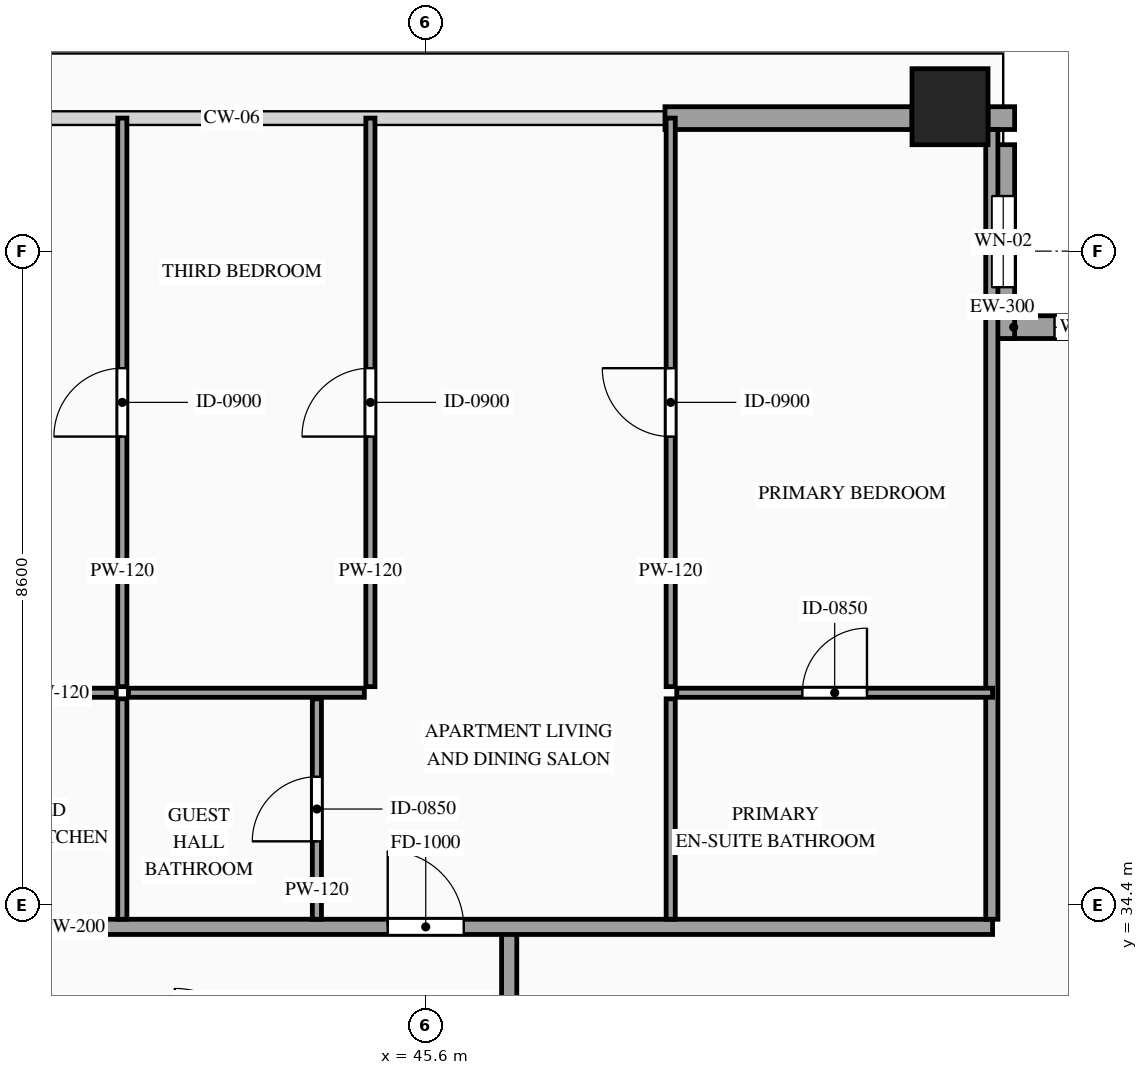
"""IFC4 building model, lengths in metres.
Left out: names, types, materials, properties, quantities, classifications, styles, units other than length and angle.
Written with IfcOpenShell. Run it as: python <this file> out.ifc"""

import sys

from ifc_helpers import new_model, si_unit, direction, frame, frame_2d, origin, origin_2d, place, context, subcontext, project, spatial, rectangle, hollow_rectangle, extrude, source, transform, mapped, element, fill, save


model = new_model("IFC4")
c1 = context("Model", 3, precision=1e-05, world=origin(), true_north=direction((0.0, 1.0)))
c2 = subcontext(c1, "Body", "Model", "MODEL_VIEW")
j1 = project(units=[si_unit("LENGTHUNIT", "METRE"), si_unit("PLANEANGLEUNIT", "RADIAN")], contexts=[c1])
p1 = place(None, origin())
s1 = spatial("IfcSite", under=j1, at=p1, CompositionType="ELEMENT")
p2 = place(p1, origin())
s2 = spatial("IfcBuilding", under=s1, at=p2, CompositionType="ELEMENT")
p3 = place(p2, frame((0.0, 0.0, 299.6)))
s3 = spatial("IfcBuildingStorey", under=s2, at=p3, CompositionType="ELEMENT", Elevation=299.6)
m1 = source(origin(), c2, "Body", "SweptSolid", [
    extrude(hollow_rectangle(XDim=1.0, YDim=1.0, WallThickness=0.048, at=origin_2d()), origin(), (0.0, 0.0, 1.0), 3.5),
])
p4 = place(p3, frame((52.5, 44.9, 0.0), z_axis=(0.0, 0.0, 1.0), x_axis=(1.0, 0.0, 0.0)))
e1 = element("IfcColumn", 1, at=p4, inside=s3, PredefinedType="COLUMN", context=c2, shape_type="MappedRepresentation", body=[
    mapped(m1, transform((0.0, 0.0, 0.0), scale=1.0)),
])
p5 = place(p3, frame((55.6, 42.0, 0.0), z_axis=(0.0, 0.0, 1.0), x_axis=(-1.0, 0.0, 0.0)))
e2 = element("IfcWall", 2, at=p5, inside=s3, PredefinedType="SOLIDWALL", context=c2, shape_type="SweptSolid", body=[
    extrude(rectangle(XDim=2.55, YDim=0.3, at=frame_2d((1.275, 0.0))), origin(), (0.0, 0.0, 1.0), 3.28),
])
p6 = place(p5, frame((0.825, 0.0, 0.85)))
e3 = element("IfcOpeningElement", 3, at=p6, cuts=e2, PredefinedType="OPENING", context=c2, shape_type="SweptSolid", body=[
    extrude(rectangle(XDim=0.9, YDim=1.5, at=frame_2d((0.45, 0.75))), frame((0.0, 0.165, 0.0), z_axis=(0.0, -1.0, 0.0), x_axis=(1.0, 0.0, 0.0)), (0.0, 0.0, 1.0), 0.33),
])
p7 = place(p3, frame((53.2, 41.85, 0.0), z_axis=(0.0, 0.0, 1.0), x_axis=(0.0, 1.0, 0.0)))
e4 = element("IfcWall", 4, at=p7, inside=s3, PredefinedType="SOLIDWALL", context=c2, shape_type="SweptSolid", body=[
    extrude(rectangle(XDim=2.55, YDim=0.3, at=frame_2d((1.275, 0.0))), origin(), (0.0, 0.0, 1.0), 3.28),
])
p8 = place(p7, frame((0.675, 0.0, 0.85)))
e5 = element("IfcOpeningElement", 5, at=p8, cuts=e4, PredefinedType="OPENING", context=c2, shape_type="SweptSolid", body=[
    extrude(rectangle(XDim=1.2, YDim=2.1, at=frame_2d((0.6, 1.05))), frame((0.0, 0.165, 0.0), z_axis=(0.0, -1.0, 0.0), x_axis=(1.0, 0.0, 0.0)), (0.0, 0.0, 1.0), 0.33),
])
m2 = source(origin(), c2, "Body", "SweptSolid", [
    extrude(rectangle(XDim=0.35, YDim=0.3, at=frame_2d((0.175, 0.0))), origin(), (0.0, 0.0, 1.0), 3.28),
])
p9 = place(p3, frame((53.0, 44.75, 0.0), z_axis=(0.0, 0.0, 1.0), x_axis=(1.0, 0.0, 0.0)))
e6 = element("IfcWall", 6, at=p9, inside=s3, PredefinedType="SOLIDWALL", context=c2, shape_type="MappedRepresentation", body=[
    mapped(m2, transform((0.0, 0.0, 0.0), scale=1.0)),
])
m3 = source(origin(), c2, "Body", "SweptSolid", [
    extrude(rectangle(XDim=3.25, YDim=0.3, at=frame_2d((1.625, 0.0))), origin(), (0.0, 0.0, 1.0), 2.885),
])
p10 = place(p3, frame((48.75, 44.75, 0.0), z_axis=(0.0, 0.0, 1.0), x_axis=(1.0, 0.0, 0.0)))
e7 = element("IfcWall", 7, at=p10, inside=s3, PredefinedType="SOLIDWALL", context=c2, shape_type="MappedRepresentation", body=[
    mapped(m3, transform((0.0, 0.0, 0.0), scale=1.0)),
])
m4 = source(origin(), c2, "Body", "SweptSolid", [
    extrude(rectangle(XDim=1.7, YDim=0.2, at=frame_2d((0.85, 0.0))), origin(), (0.0, 0.0, 1.0), 3.28),
])
p11 = place(p3, frame((46.7, 32.35, 0.0), z_axis=(0.0, 0.0, 1.0), x_axis=(0.0, 1.0, 0.0)))
e8 = element("IfcWall", 8, at=p11, inside=s3, PredefinedType="PARTITIONING", context=c2, shape_type="MappedRepresentation", body=[
    mapped(m4, transform((0.0, 0.0, 0.0), scale=1.0)),
])
p12 = place(p3, frame((37.08, 34.11, 0.0), z_axis=(0.0, 0.0, 1.0), x_axis=(1.0, 0.0, 0.0)))
e9 = element("IfcWall", 9, at=p12, inside=s3, PredefinedType="PARTITIONING", context=c2, shape_type="SweptSolid", body=[
    extrude(rectangle(XDim=15.98, YDim=0.2, at=frame_2d((7.99, 0.0))), origin(), (0.0, 0.0, 1.0), 3.28),
])
p13 = place(p12, frame((8.022, 0.0, 0.0)))
e10 = element("IfcOpeningElement", 10, at=p13, cuts=e9, PredefinedType="OPENING", context=c2, shape_type="SweptSolid", body=[
    extrude(rectangle(XDim=1.0, YDim=2.2, at=frame_2d((0.5, 1.1))), frame((0.0, 0.115, 0.0), z_axis=(0.0, -1.0, 0.0), x_axis=(1.0, 0.0, 0.0)), (0.0, 0.0, 1.0), 0.23),
])
m5 = source(origin(), c2, "Body", "SweptSolid", [
    extrude(rectangle(XDim=10.39, YDim=0.16, at=frame_2d((5.195, 0.0))), origin(), (0.0, 0.0, 1.0), 3.28),
])
p14 = place(p3, frame((53.05, 34.21, 0.0), z_axis=(0.0, 0.0, 1.0), x_axis=(0.0, 1.0, 0.0)))
e11 = element("IfcWall", 11, at=p14, inside=s3, PredefinedType="PARTITIONING", context=c2, shape_type="MappedRepresentation", body=[
    mapped(m5, transform((0.0, 0.0, 0.0), scale=1.0)),
])
p15 = place(p3, frame((37.08, 37.19, 0.0), z_axis=(0.0, 0.0, 1.0), x_axis=(1.0, 0.0, 0.0)))
e12 = element("IfcWall", 12, at=p15, inside=s3, PredefinedType="PARTITIONING", context=c2, shape_type="SweptSolid", body=[
    extrude(rectangle(XDim=4.45, YDim=0.12, at=frame_2d((2.225, 0.0))), origin(), (0.0, 0.0, 1.0), 3.28),
])
p16 = place(p15, frame((1.8, 0.0, 0.0)))
e13 = element("IfcOpeningElement", 13, at=p16, cuts=e12, PredefinedType="OPENING", context=c2, shape_type="SweptSolid", body=[
    extrude(rectangle(XDim=0.85, YDim=2.1, at=frame_2d((0.425, 1.05))), frame((0.0, 0.075, 0.0), z_axis=(0.0, -1.0, 0.0), x_axis=(1.0, 0.0, 0.0)), (0.0, 0.0, 1.0), 0.15),
])
m6 = source(origin(), c2, "Body", "SweptSolid", [
    extrude(rectangle(XDim=2.9, YDim=0.12, at=frame_2d((1.45, 0.0))), origin(), (0.0, 0.0, 1.0), 3.28),
])
p17 = place(p3, frame((41.61, 34.21, 0.0), z_axis=(0.0, 0.0, 1.0), x_axis=(0.0, 1.0, 0.0)))
e14 = element("IfcWall", 14, at=p17, inside=s3, PredefinedType="PARTITIONING", context=c2, shape_type="MappedRepresentation", body=[
    mapped(m6, transform((0.0, 0.0, 0.0), scale=1.0)),
])
p18 = place(p3, frame((44.17, 34.21, 0.0), z_axis=(0.0, 0.0, 1.0), x_axis=(0.0, 1.0, 0.0)))
e15 = element("IfcWall", 15, at=p18, inside=s3, PredefinedType="PARTITIONING", context=c2, shape_type="SweptSolid", body=[
    extrude(rectangle(XDim=2.9, YDim=0.12, at=frame_2d((1.45, 0.0))), origin(), (0.0, 0.0, 1.0), 3.28),
])
p19 = place(p18, frame((1.025, 0.0, 0.0)))
e16 = element("IfcOpeningElement", 16, at=p19, cuts=e15, PredefinedType="OPENING", context=c2, shape_type="SweptSolid", body=[
    extrude(rectangle(XDim=0.85, YDim=2.1, at=frame_2d((0.425, 1.05))), frame((0.0, 0.075, 0.0), z_axis=(0.0, -1.0, 0.0), x_axis=(1.0, 0.0, 0.0)), (0.0, 0.0, 1.0), 0.15),
])
p20 = place(p3, frame((48.905, 37.19, 0.0), z_axis=(0.0, 0.0, 1.0), x_axis=(1.0, 0.0, 0.0)))
e17 = element("IfcWall", 17, at=p20, inside=s3, PredefinedType="PARTITIONING", context=c2, shape_type="SweptSolid", body=[
    extrude(rectangle(XDim=4.155, YDim=0.12, at=frame_2d((2.078, 0.0))), origin(), (0.0, 0.0, 1.0), 3.28),
])
p21 = place(p20, frame((1.653, 0.0, 0.0)))
e18 = element("IfcOpeningElement", 18, at=p21, cuts=e17, PredefinedType="OPENING", context=c2, shape_type="SweptSolid", body=[
    extrude(rectangle(XDim=0.85, YDim=2.1, at=frame_2d((0.425, 1.05))), frame((0.0, 0.075, 0.0), z_axis=(0.0, -1.0, 0.0), x_axis=(1.0, 0.0, 0.0)), (0.0, 0.0, 1.0), 0.15),
])
p22 = place(p3, frame((48.825, 34.21, 0.0), z_axis=(0.0, 0.0, 1.0), x_axis=(0.0, 1.0, 0.0)))
e19 = element("IfcWall", 19, at=p22, inside=s3, PredefinedType="PARTITIONING", context=c2, shape_type="MappedRepresentation", body=[
    mapped(m6, transform((0.0, 0.0, 0.0), scale=1.0)),
])
p23 = place(p3, frame((41.61, 37.27, 0.0), z_axis=(0.0, 0.0, 1.0), x_axis=(0.0, 1.0, 0.0)))
e20 = element("IfcWall", 20, at=p23, inside=s3, PredefinedType="PARTITIONING", context=c2, shape_type="SweptSolid", body=[
    extrude(rectangle(XDim=7.48, YDim=0.12, at=frame_2d((3.74, 0.0))), origin(), (0.0, 0.0, 1.0), 3.28),
])
p24 = place(p23, frame((3.29, 0.0, 0.0)))
e21 = element("IfcOpeningElement", 21, at=p24, cuts=e20, PredefinedType="OPENING", context=c2, shape_type="SweptSolid", body=[
    extrude(rectangle(XDim=0.9, YDim=2.15, at=frame_2d((0.45, 1.075))), frame((0.0, 0.075, 0.0), z_axis=(0.0, -1.0, 0.0), x_axis=(1.0, 0.0, 0.0)), (0.0, 0.0, 1.0), 0.15),
])
p25 = place(p3, frame((48.825, 37.27, 0.0), z_axis=(0.0, 0.0, 1.0), x_axis=(0.0, 1.0, 0.0)))
e22 = element("IfcWall", 22, at=p25, inside=s3, PredefinedType="PARTITIONING", context=c2, shape_type="SweptSolid", body=[
    extrude(rectangle(XDim=7.48, YDim=0.12, at=frame_2d((3.74, 0.0))), origin(), (0.0, 0.0, 1.0), 3.28),
])
p26 = place(p25, frame((3.29, 0.0, 0.0)))
e23 = element("IfcOpeningElement", 23, at=p26, cuts=e22, PredefinedType="OPENING", context=c2, shape_type="SweptSolid", body=[
    extrude(rectangle(XDim=0.9, YDim=2.15, at=frame_2d((0.45, 1.075))), frame((0.0, 0.075, 0.0), z_axis=(0.0, -1.0, 0.0), x_axis=(1.0, 0.0, 0.0)), (0.0, 0.0, 1.0), 0.15),
])
m7 = source(origin(), c2, "Body", "SweptSolid", [
    extrude(rectangle(XDim=3.104, YDim=0.12, at=frame_2d((1.552, 0.0))), origin(), (0.0, 0.0, 1.0), 3.28),
])
p27 = place(p3, frame((41.69, 37.19, 0.0), z_axis=(0.0, 0.0, 1.0), x_axis=(1.0, 0.0, 0.0)))
e24 = element("IfcWall", 24, at=p27, inside=s3, PredefinedType="PARTITIONING", context=c2, shape_type="MappedRepresentation", body=[
    mapped(m7, transform((0.0, 0.0, 0.0), scale=1.0)),
])
p28 = place(p3, frame((44.874, 37.27, 0.0), z_axis=(0.0, 0.0, 1.0), x_axis=(0.0, 1.0, 0.0)))
e25 = element("IfcWall", 25, at=p28, inside=s3, PredefinedType="PARTITIONING", context=c2, shape_type="SweptSolid", body=[
    extrude(rectangle(XDim=7.48, YDim=0.12, at=frame_2d((3.74, 0.0))), origin(), (0.0, 0.0, 1.0), 3.28),
])
p29 = place(p28, frame((3.29, 0.0, 0.0)))
e26 = element("IfcOpeningElement", 26, at=p29, cuts=e25, PredefinedType="OPENING", context=c2, shape_type="SweptSolid", body=[
    extrude(rectangle(XDim=0.9, YDim=2.15, at=frame_2d((0.45, 1.075))), frame((0.0, 0.075, 0.0), z_axis=(0.0, -1.0, 0.0), x_axis=(1.0, 0.0, 0.0)), (0.0, 0.0, 1.0), 0.15),
])
m8 = source(origin(), c2, "Body", "SweptSolid", [
    extrude(rectangle(XDim=0.9, YDim=1.5, at=frame_2d((0.45, 0.75))), frame((0.0, 0.03, 0.0), z_axis=(0.0, -1.0, 0.0), x_axis=(1.0, 0.0, 0.0)), (0.0, 0.0, 1.0), 0.06),
])
p30 = place(p6, origin())
e27 = element("IfcWindow", 27, at=p30, inside=s3, PartitioningType="SINGLE_PANEL", PredefinedType="WINDOW", context=c2, shape_type="MappedRepresentation", body=[
    mapped(m8, transform((0.0, 0.0, 0.0), scale=1.0)),
])
fill(e3, e27)
m9 = source(origin(), c2, "Body", "SweptSolid", [
    extrude(rectangle(XDim=1.2, YDim=2.1, at=frame_2d((0.6, 1.05))), frame((0.0, 0.03, 0.0), z_axis=(0.0, -1.0, 0.0), x_axis=(1.0, 0.0, 0.0)), (0.0, 0.0, 1.0), 0.06),
])
p31 = place(p8, origin())
e28 = element("IfcWindow", 28, at=p31, inside=s3, PartitioningType="SINGLE_PANEL", PredefinedType="WINDOW", context=c2, shape_type="MappedRepresentation", body=[
    mapped(m9, transform((0.0, 0.0, 0.0), scale=1.0)),
])
fill(e5, e28)
m10 = source(origin(), c2, "Body", "SweptSolid", [
    extrude(rectangle(XDim=1.0, YDim=2.2, at=frame_2d((0.5, 1.1))), frame((0.0, 0.025, 0.0), z_axis=(0.0, -1.0, 0.0), x_axis=(1.0, 0.0, 0.0)), (0.0, 0.0, 1.0), 0.05),
])
p32 = place(p13, origin())
e29 = element("IfcDoor", 29, at=p32, inside=s3, OperationType="SINGLE_SWING_LEFT", PredefinedType="DOOR", context=c2, shape_type="MappedRepresentation", body=[
    mapped(m10, transform((0.0, 0.0, 0.0), scale=1.0)),
])
fill(e10, e29)
m11 = source(origin(), c2, "Body", "SweptSolid", [
    extrude(rectangle(XDim=0.85, YDim=2.1, at=frame_2d((0.425, 1.05))), frame((0.0, 0.025, 0.0), z_axis=(0.0, -1.0, 0.0), x_axis=(1.0, 0.0, 0.0)), (0.0, 0.0, 1.0), 0.05),
])
p33 = place(p19, origin())
e30 = element("IfcDoor", 30, at=p33, inside=s3, OperationType="SINGLE_SWING_LEFT", PredefinedType="DOOR", context=c2, shape_type="MappedRepresentation", body=[
    mapped(m11, transform((0.0, 0.0, 0.0), scale=1.0)),
])
fill(e16, e30)
p34 = place(p21, origin())
e31 = element("IfcDoor", 31, at=p34, inside=s3, OperationType="SINGLE_SWING_RIGHT", PredefinedType="DOOR", context=c2, shape_type="MappedRepresentation", body=[
    mapped(m11, transform((0.0, 0.0, 0.0), scale=1.0)),
])
fill(e18, e31)
m12 = source(origin(), c2, "Body", "SweptSolid", [
    extrude(rectangle(XDim=0.9, YDim=2.15, at=frame_2d((0.45, 1.075))), frame((0.0, 0.025, 0.0), z_axis=(0.0, -1.0, 0.0), x_axis=(1.0, 0.0, 0.0)), (0.0, 0.0, 1.0), 0.05),
])
p35 = place(p24, origin())
e32 = element("IfcDoor", 32, at=p35, inside=s3, OperationType="SINGLE_SWING_LEFT", PredefinedType="DOOR", context=c2, shape_type="MappedRepresentation", body=[
    mapped(m12, transform((0.0, 0.0, 0.0), scale=1.0)),
])
fill(e21, e32)
p36 = place(p26, origin())
e33 = element("IfcDoor", 33, at=p36, inside=s3, OperationType="SINGLE_SWING_RIGHT", PredefinedType="DOOR", context=c2, shape_type="MappedRepresentation", body=[
    mapped(m12, transform((0.0, 0.0, 0.0), scale=1.0)),
])
fill(e23, e33)
p37 = place(p29, origin())
e34 = element("IfcDoor", 34, at=p37, inside=s3, OperationType="SINGLE_SWING_LEFT", PredefinedType="DOOR", context=c2, shape_type="MappedRepresentation", body=[
    mapped(m12, transform((0.0, 0.0, 0.0), scale=1.0)),
])
fill(e26, e34)
save(model, sys.argv[1])
